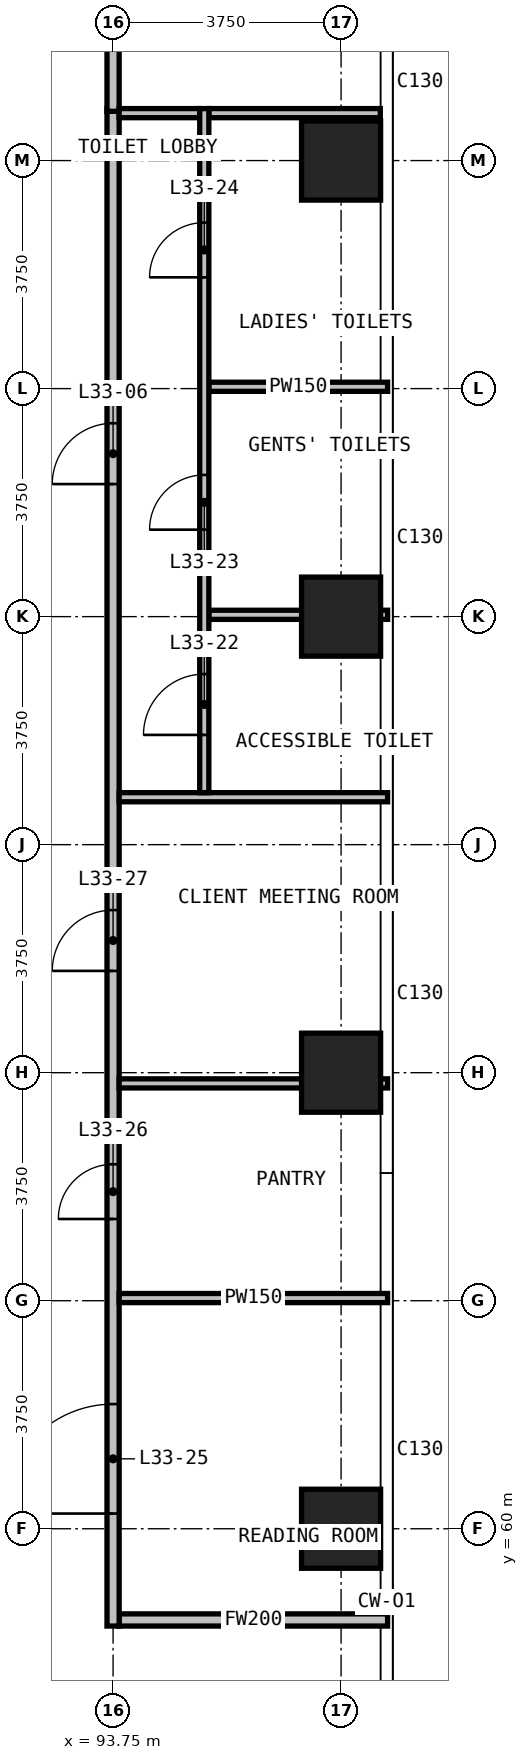
"""IFC4 building model, lengths in metres.
Left out: names, types, materials, properties, quantities, classifications, styles, units other than length and angle.
Written with IfcOpenShell. Run it as: python <this file> out.ifc"""

import sys

from ifc_helpers import new_model, si_unit, direction, frame, frame_2d, origin, origin_2d, place, context, subcontext, project, spatial, rectangle, extrude, element, fill, save


model = new_model("IFC4")
c1 = context("Model", 3, precision=1e-05, world=origin(), true_north=direction((0.0, 1.0)))
c2 = subcontext(c1, "Body", "Model", "MODEL_VIEW")
j1 = project(units=[si_unit("LENGTHUNIT", "METRE"), si_unit("PLANEANGLEUNIT", "RADIAN")], contexts=[c1])
p1 = place(None, origin())
s1 = spatial("IfcSite", under=j1, at=p1, CompositionType="ELEMENT")
p2 = place(p1, origin())
s2 = spatial("IfcBuilding", under=s1, at=p2, CompositionType="ELEMENT")
p3 = place(p2, frame((0.0, 0.0, 132.4)))
s3 = spatial("IfcBuildingStorey", under=s2, at=p3, CompositionType="ELEMENT", Elevation=132.4)
for number, where, z_axis, x_axis in (
    (1, (97.5, 60.0, 0.0), (0.0, 0.0, 1.0), (1.0, 0.0, 0.0)),
    (2, (97.5, 67.5, 0.0), (0.0, 0.0, 1.0), (1.0, 0.0, 0.0)),
    (3, (97.5, 75.0, 0.0), (0.0, 0.0, 1.0), (1.0, 0.0, 0.0)),
    (4, (97.5, 82.5, 0.0), (0.0, 0.0, 1.0), (1.0, 0.0, 0.0)),
):
    element("IfcColumn", number, at=place(p3, frame(where, z_axis=z_axis, x_axis=x_axis)), inside=s3, PredefinedType="COLUMN", context=c2, shape_type="SweptSolid", body=[
        extrude(rectangle(XDim=1.3, YDim=1.3, at=origin_2d()), origin(), (0.0, 0.0, 1.0), 3.6),
    ])
p4 = place(p3, frame((93.85, 58.5, 0.0), z_axis=(0.0, 0.0, 1.0), x_axis=(1.0, 0.0, 0.0)))
e5 = element("IfcWall", 5, at=p4, inside=s3, PredefinedType="PARTITIONING", context=c2, shape_type="SweptSolid", body=[
    extrude(rectangle(XDim=4.415, YDim=0.2, at=frame_2d((2.208, 0.0))), origin(), (0.0, 0.0, 1.0), 3.3),
])
p5 = place(p3, frame((93.75, 58.4, 0.0), z_axis=(0.0, 0.0, 1.0), x_axis=(0.0, 1.0, 0.0)))
e6 = element("IfcWall", 6, at=p5, inside=s3, PredefinedType="PARTITIONING", context=c2, shape_type="SweptSolid", body=[
    extrude(rectangle(XDim=24.955, YDim=0.2, at=frame_2d((12.478, 0.0))), origin(), (0.0, 0.0, 1.0), 3.3),
])
p6 = place(p5, frame((18.78, 0.0, 0.0)))
e7 = element("IfcOpeningElement", 7, at=p6, cuts=e6, PredefinedType="OPENING", context=c2, shape_type="SweptSolid", body=[
    extrude(rectangle(XDim=1.0, YDim=2.2, at=frame_2d((0.5, 1.1))), frame((0.0, 0.11, 0.0), z_axis=(0.0, -1.0, 0.0), x_axis=(1.0, 0.0, 0.0)), (0.0, 0.0, 1.0), 0.22),
])
p7 = place(p5, frame((1.85, 0.0, 0.0)))
e8 = element("IfcOpeningElement", 8, at=p7, cuts=e6, PredefinedType="OPENING", context=c2, shape_type="SweptSolid", body=[
    extrude(rectangle(XDim=1.8, YDim=2.2, at=frame_2d((0.9, 1.1))), frame((0.0, 0.11, 0.0), z_axis=(0.0, -1.0, 0.0), x_axis=(1.0, 0.0, 0.0)), (0.0, 0.0, 1.0), 0.22),
])
p8 = place(p5, frame((6.694, 0.0, 0.0)))
e9 = element("IfcOpeningElement", 9, at=p8, cuts=e6, PredefinedType="OPENING", context=c2, shape_type="SweptSolid", body=[
    extrude(rectangle(XDim=0.9, YDim=2.2, at=frame_2d((0.45, 1.1))), frame((0.0, 0.11, 0.0), z_axis=(0.0, -1.0, 0.0), x_axis=(1.0, 0.0, 0.0)), (0.0, 0.0, 1.0), 0.22),
])
p9 = place(p5, frame((10.774, 0.0, 0.0)))
e10 = element("IfcOpeningElement", 10, at=p9, cuts=e6, PredefinedType="OPENING", context=c2, shape_type="SweptSolid", body=[
    extrude(rectangle(XDim=1.0, YDim=2.2, at=frame_2d((0.5, 1.1))), frame((0.0, 0.11, 0.0), z_axis=(0.0, -1.0, 0.0), x_axis=(1.0, 0.0, 0.0)), (0.0, 0.0, 1.0), 0.22),
])
p10 = place(p3, frame((93.75, 83.31, 0.0), z_axis=(0.0, 0.0, 1.0), x_axis=(0.0, 1.0, 0.0)))
e11 = element("IfcWall", 11, at=p10, inside=s3, PredefinedType="PARTITIONING", context=c2, shape_type="SweptSolid", body=[
    extrude(rectangle(XDim=7.335, YDim=0.2, at=frame_2d((3.667, 0.0))), origin(), (0.0, 0.0, 1.0), 3.3),
])
for number, where, z_axis, x_axis in (
    (12, (93.85, 63.794, 0.0), (0.0, 0.0, 1.0), (1.0, 0.0, 0.0)),
    (13, (93.85, 67.324, 0.0), (0.0, 0.0, 1.0), (1.0, 0.0, 0.0)),
    (14, (93.85, 72.03, 0.0), (0.0, 0.0, 1.0), (1.0, 0.0, 0.0)),
):
    element("IfcWall", number, at=place(p3, frame(where, z_axis=z_axis, x_axis=x_axis)), inside=s3, PredefinedType="PARTITIONING", context=c2, shape_type="SweptSolid", body=[
        extrude(rectangle(XDim=4.415, YDim=0.15, at=frame_2d((2.208, 0.0))), origin(), (0.0, 0.0, 1.0), 3.3),
    ])
for number, where, z_axis, x_axis in (
    (15, (95.325, 75.03, 0.0), (0.0, 0.0, 1.0), (1.0, 0.0, 0.0)),
    (16, (95.325, 78.78, 0.0), (0.0, 0.0, 1.0), (1.0, 0.0, 0.0)),
):
    element("IfcWall", number, at=place(p3, frame(where, z_axis=z_axis, x_axis=x_axis)), inside=s3, PredefinedType="PARTITIONING", context=c2, shape_type="SweptSolid", body=[
        extrude(rectangle(XDim=2.94, YDim=0.15, at=frame_2d((1.47, 0.0))), origin(), (0.0, 0.0, 1.0), 3.3),
    ])
p11 = place(p3, frame((93.85, 83.28, 0.0), z_axis=(0.0, 0.0, 1.0), x_axis=(1.0, 0.0, 0.0)))
e17 = element("IfcWall", 17, at=p11, inside=s3, PredefinedType="PARTITIONING", context=c2, shape_type="SweptSolid", body=[
    extrude(rectangle(XDim=1.325, YDim=0.15, at=frame_2d((0.663, 0.0))), origin(), (0.0, 0.0, 1.0), 3.3),
])
p12 = place(p3, frame((95.325, 83.28, 0.0), z_axis=(0.0, 0.0, 1.0), x_axis=(1.0, 0.0, 0.0)))
e18 = element("IfcWall", 18, at=p12, inside=s3, PredefinedType="PARTITIONING", context=c2, shape_type="SweptSolid", body=[
    extrude(rectangle(XDim=2.82, YDim=0.15, at=frame_2d((1.41, 0.0))), origin(), (0.0, 0.0, 1.0), 3.3),
])
p13 = place(p3, frame((95.25, 72.105, 0.0), z_axis=(0.0, 0.0, 1.0), x_axis=(0.0, 1.0, 0.0)))
e19 = element("IfcWall", 19, at=p13, inside=s3, PredefinedType="PARTITIONING", context=c2, shape_type="SweptSolid", body=[
    extrude(rectangle(XDim=11.25, YDim=0.15, at=frame_2d((5.625, 0.0))), origin(), (0.0, 0.0, 1.0), 3.3),
])
p14 = place(p13, frame((0.95, 0.0, 0.0)))
e20 = element("IfcOpeningElement", 20, at=p14, cuts=e19, PredefinedType="OPENING", context=c2, shape_type="SweptSolid", body=[
    extrude(rectangle(XDim=1.0, YDim=2.2, at=frame_2d((0.5, 1.1))), frame((0.0, 0.085, 0.0), z_axis=(0.0, -1.0, 0.0), x_axis=(1.0, 0.0, 0.0)), (0.0, 0.0, 1.0), 0.17),
])
p15 = place(p13, frame((4.325, 0.0, 0.0)))
e21 = element("IfcOpeningElement", 21, at=p15, cuts=e19, PredefinedType="OPENING", context=c2, shape_type="SweptSolid", body=[
    extrude(rectangle(XDim=0.9, YDim=2.2, at=frame_2d((0.45, 1.1))), frame((0.0, 0.085, 0.0), z_axis=(0.0, -1.0, 0.0), x_axis=(1.0, 0.0, 0.0)), (0.0, 0.0, 1.0), 0.17),
])
p16 = place(p13, frame((8.475, 0.0, 0.0)))
e22 = element("IfcOpeningElement", 22, at=p16, cuts=e19, PredefinedType="OPENING", context=c2, shape_type="SweptSolid", body=[
    extrude(rectangle(XDim=0.9, YDim=2.2, at=frame_2d((0.45, 1.1))), frame((0.0, 0.085, 0.0), z_axis=(0.0, -1.0, 0.0), x_axis=(1.0, 0.0, 0.0)), (0.0, 0.0, 1.0), 0.17),
])
p17 = place(p6, origin())
e23 = element("IfcDoor", 23, at=p17, inside=s3, OperationType="SINGLE_SWING_LEFT", PredefinedType="DOOR", context=c2, shape_type="SweptSolid", body=[
    extrude(rectangle(XDim=1.0, YDim=2.2, at=frame_2d((0.5, 1.1))), frame((0.0, 0.025, 0.0), z_axis=(0.0, -1.0, 0.0), x_axis=(1.0, 0.0, 0.0)), (0.0, 0.0, 1.0), 0.05),
])
fill(e7, e23)
p18 = place(p14, origin())
e24 = element("IfcDoor", 24, at=p18, inside=s3, OperationType="SINGLE_SWING_RIGHT", PredefinedType="DOOR", context=c2, shape_type="SweptSolid", body=[
    extrude(rectangle(XDim=1.0, YDim=2.2, at=frame_2d((0.5, 1.1))), frame((0.0, 0.025, 0.0), z_axis=(0.0, -1.0, 0.0), x_axis=(1.0, 0.0, 0.0)), (0.0, 0.0, 1.0), 0.05),
])
fill(e20, e24)
p19 = place(p15, origin())
e25 = element("IfcDoor", 25, at=p19, inside=s3, OperationType="SINGLE_SWING_LEFT", PredefinedType="DOOR", context=c2, shape_type="SweptSolid", body=[
    extrude(rectangle(XDim=0.9, YDim=2.2, at=frame_2d((0.45, 1.1))), frame((0.0, 0.025, 0.0), z_axis=(0.0, -1.0, 0.0), x_axis=(1.0, 0.0, 0.0)), (0.0, 0.0, 1.0), 0.05),
])
fill(e21, e25)
p20 = place(p16, origin())
e26 = element("IfcDoor", 26, at=p20, inside=s3, OperationType="SINGLE_SWING_LEFT", PredefinedType="DOOR", context=c2, shape_type="SweptSolid", body=[
    extrude(rectangle(XDim=0.9, YDim=2.2, at=frame_2d((0.45, 1.1))), frame((0.0, 0.025, 0.0), z_axis=(0.0, -1.0, 0.0), x_axis=(1.0, 0.0, 0.0)), (0.0, 0.0, 1.0), 0.05),
])
fill(e22, e26)
p21 = place(p7, origin())
e27 = element("IfcDoor", 27, at=p21, inside=s3, OperationType="DOUBLE_DOOR_SINGLE_SWING", PredefinedType="DOOR", context=c2, shape_type="SweptSolid", body=[
    extrude(rectangle(XDim=1.8, YDim=2.2, at=frame_2d((0.9, 1.1))), frame((0.0, 0.025, 0.0), z_axis=(0.0, -1.0, 0.0), x_axis=(1.0, 0.0, 0.0)), (0.0, 0.0, 1.0), 0.05),
])
fill(e8, e27)
p22 = place(p8, origin())
e28 = element("IfcDoor", 28, at=p22, inside=s3, OperationType="SINGLE_SWING_LEFT", PredefinedType="DOOR", context=c2, shape_type="SweptSolid", body=[
    extrude(rectangle(XDim=0.9, YDim=2.2, at=frame_2d((0.45, 1.1))), frame((0.0, 0.025, 0.0), z_axis=(0.0, -1.0, 0.0), x_axis=(1.0, 0.0, 0.0)), (0.0, 0.0, 1.0), 0.05),
])
fill(e9, e28)
p23 = place(p9, origin())
e29 = element("IfcDoor", 29, at=p23, inside=s3, OperationType="SINGLE_SWING_RIGHT", PredefinedType="DOOR", context=c2, shape_type="SweptSolid", body=[
    extrude(rectangle(XDim=1.0, YDim=2.2, at=frame_2d((0.5, 1.1))), frame((0.0, 0.025, 0.0), z_axis=(0.0, -1.0, 0.0), x_axis=(1.0, 0.0, 0.0)), (0.0, 0.0, 1.0), 0.05),
])
fill(e10, e29)
save(model, sys.argv[1])
